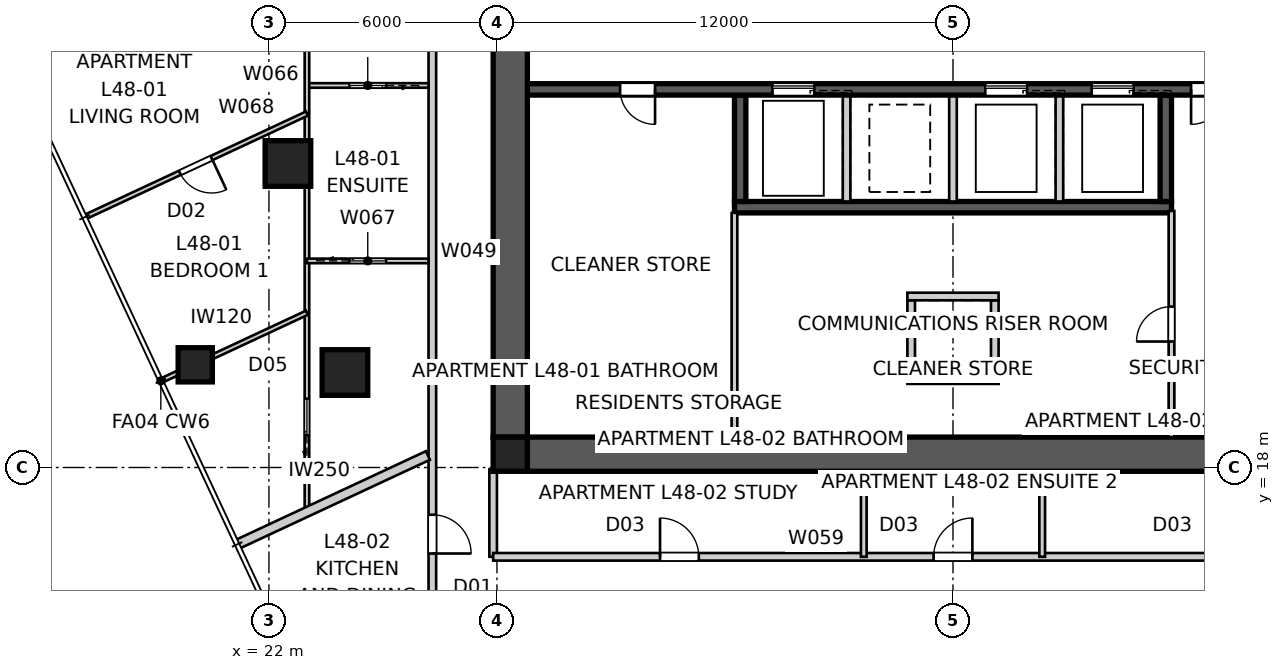
"""IFC4 building model, lengths in metres.
Left out: names, types, materials, properties, quantities, classifications, styles, units other than length and angle.
Written with IfcOpenShell. Run it as: python <this file> out.ifc"""

import sys

from ifc_helpers import new_model, si_unit, direction, frame, frame_2d, origin, origin_2d, place, context, subcontext, project, spatial, polyline, rectangle, outline, extrude, element, fill, save


model = new_model("IFC4")
c1 = context("Model", 3, precision=1e-05, world=origin(), true_north=direction((0.0, 1.0)))
c2 = subcontext(c1, "Body", "Model", "MODEL_VIEW")
j1 = project(units=[si_unit("LENGTHUNIT", "METRE"), si_unit("PLANEANGLEUNIT", "RADIAN")], contexts=[c1])
p1 = place(None, origin())
s1 = spatial("IfcSite", under=j1, at=p1, CompositionType="ELEMENT")
p2 = place(p1, origin())
s2 = spatial("IfcBuilding", under=s1, at=p2, CompositionType="ELEMENT")
p3 = place(p2, frame((0.0, 0.0, 176.0)))
s3 = spatial("IfcBuildingStorey", under=s2, at=p3, CompositionType="ELEMENT", Elevation=176.0)
p4 = place(p3, frame((51.2, 18.35, 0.0), z_axis=(0.0, 0.0, 1.0), x_axis=(-1.0, 0.0, 0.0)))
e1 = element("IfcWall", 1, at=p4, inside=s3, PredefinedType="SHEAR", context=c2, shape_type="SweptSolid", body=[
    extrude(outline(polyline([(0.0, -0.45), (22.4, -0.45), (22.4, -0.025), (22.85, -0.025), (22.85, 0.025), (22.4, 0.025), (22.4, 0.45), (0.0, 0.45), (0.0, 0.025), (-0.45, 0.025), (-0.45, -0.025), (0.0, -0.025), (0.0, -0.45)])), origin(), (0.0, 0.0, 1.0), 3.4),
])
p5 = place(p3, frame((28.35, 41.2, 0.0), z_axis=(0.0, 0.0, 1.0), x_axis=(0.0, -1.0, 0.0)))
e2 = element("IfcWall", 2, at=p5, inside=s3, PredefinedType="SHEAR", context=c2, shape_type="SweptSolid", body=[
    extrude(outline(polyline([(0.0, -0.45), (22.4, -0.45), (22.4, -0.025), (22.85, -0.025), (22.85, 0.025), (22.4, 0.025), (22.4, 0.45), (0.0, 0.45), (0.0, 0.025), (-0.45, 0.025), (-0.45, -0.025), (0.0, -0.025), (0.0, -0.45)])), origin(), (0.0, 0.0, 1.0), 3.4),
])
p6 = place(p5, frame((11.14, 0.0, 0.0)))
e3 = element("IfcOpeningElement", 3, at=p6, cuts=e2, PredefinedType="OPENING", context=c2, shape_type="SweptSolid", body=[
    extrude(rectangle(XDim=1.02, YDim=2.4, at=frame_2d((0.51, 1.2))), frame((0.0, 0.46, 0.0), z_axis=(0.0, -1.0, 0.0), x_axis=(1.0, 0.0, 0.0)), (0.0, 0.0, 1.0), 0.92),
])
p7 = place(p3, frame((51.2, 27.95, 0.0), z_axis=(0.0, 0.0, 1.0), x_axis=(-1.0, 0.0, 0.0)))
e4 = element("IfcWall", 4, at=p7, inside=s3, PredefinedType="SHEAR", context=c2, shape_type="SweptSolid", body=[
    extrude(rectangle(XDim=22.4, YDim=0.3, at=frame_2d((11.2, 0.0))), origin(), (0.0, 0.0, 1.0), 3.4),
])
p8 = place(p7, frame((19.04, 0.0, 0.0)))
e5 = element("IfcOpeningElement", 5, at=p8, cuts=e4, PredefinedType="OPENING", context=c2, shape_type="SweptSolid", body=[
    extrude(rectangle(XDim=0.92, YDim=2.1, at=frame_2d((0.46, 1.05))), frame((0.0, 0.16, 0.0), z_axis=(0.0, -1.0, 0.0), x_axis=(1.0, 0.0, 0.0)), (0.0, 0.0, 1.0), 0.32),
])
p9 = place(p7, frame((1.265, 0.0, 0.0)))
e6 = element("IfcOpeningElement", 6, at=p9, cuts=e4, PredefinedType="OPENING", context=c2, shape_type="SweptSolid", body=[
    extrude(rectangle(XDim=1.02, YDim=2.1, at=frame_2d((0.51, 1.05))), frame((0.0, 0.16, 0.0), z_axis=(0.0, -1.0, 0.0), x_axis=(1.0, 0.0, 0.0)), (0.0, 0.0, 1.0), 0.32),
])
p10 = place(p7, frame((4.015, 0.0, 0.0)))
e7 = element("IfcOpeningElement", 7, at=p10, cuts=e4, PredefinedType="OPENING", context=c2, shape_type="SweptSolid", body=[
    extrude(rectangle(XDim=0.92, YDim=2.1, at=frame_2d((0.46, 1.05))), frame((0.0, 0.16, 0.0), z_axis=(0.0, -1.0, 0.0), x_axis=(1.0, 0.0, 0.0)), (0.0, 0.0, 1.0), 0.32),
])
p11 = place(p7, frame((6.45, 0.0, 0.0)))
e8 = element("IfcOpeningElement", 8, at=p11, cuts=e4, PredefinedType="OPENING", context=c2, shape_type="SweptSolid", body=[
    extrude(rectangle(XDim=1.1, YDim=2.1, at=frame_2d((0.55, 1.05))), frame((0.0, 0.16, 0.0), z_axis=(0.0, -1.0, 0.0), x_axis=(1.0, 0.0, 0.0)), (0.0, 0.0, 1.0), 0.32),
])
p12 = place(p7, frame((9.25, 0.0, 0.0)))
e9 = element("IfcOpeningElement", 9, at=p12, cuts=e4, PredefinedType="OPENING", context=c2, shape_type="SweptSolid", body=[
    extrude(rectangle(XDim=1.1, YDim=2.1, at=frame_2d((0.55, 1.05))), frame((0.0, 0.16, 0.0), z_axis=(0.0, -1.0, 0.0), x_axis=(1.0, 0.0, 0.0)), (0.0, 0.0, 1.0), 0.32),
])
p13 = place(p7, frame((14.85, 0.0, 0.0)))
e10 = element("IfcOpeningElement", 10, at=p13, cuts=e4, PredefinedType="OPENING", context=c2, shape_type="SweptSolid", body=[
    extrude(rectangle(XDim=1.1, YDim=2.1, at=frame_2d((0.55, 1.05))), frame((0.0, 0.16, 0.0), z_axis=(0.0, -1.0, 0.0), x_axis=(1.0, 0.0, 0.0)), (0.0, 0.0, 1.0), 0.32),
])
p14 = place(p3, frame((45.75, 24.85, 0.0), z_axis=(0.0, 0.0, 1.0), x_axis=(-1.0, 0.0, 0.0)))
e11 = element("IfcWall", 11, at=p14, inside=s3, PredefinedType="SHEAR", context=c2, shape_type="SweptSolid", body=[
    extrude(rectangle(XDim=11.5, YDim=0.3, at=frame_2d((5.75, 0.0))), origin(), (0.0, 0.0, 1.0), 3.4),
])
p15 = place(p3, frame((45.6, 27.8, 0.0), z_axis=(0.0, 0.0, 1.0), x_axis=(0.0, -1.0, 0.0)))
e12 = element("IfcWall", 12, at=p15, inside=s3, PredefinedType="SHEAR", context=c2, shape_type="SweptSolid", body=[
    extrude(rectangle(XDim=2.8, YDim=0.3, at=frame_2d((1.4, 0.0))), origin(), (0.0, 0.0, 1.0), 3.4),
])
for number, where, z_axis, x_axis in (
    (13, (42.8, 27.8, 0.0), (0.0, 0.0, 1.0), (0.0, -1.0, 0.0)),
    (14, (40.0, 27.8, 0.0), (0.0, 0.0, 1.0), (0.0, -1.0, 0.0)),
    (15, (37.2, 27.8, 0.0), (0.0, 0.0, 1.0), (0.0, -1.0, 0.0)),
):
    element("IfcWall", number, at=place(p3, frame(where, z_axis=z_axis, x_axis=x_axis)), inside=s3, PredefinedType="SOLIDWALL", context=c2, shape_type="SweptSolid", body=[
        extrude(rectangle(XDim=2.8, YDim=0.2, at=frame_2d((1.4, 0.0))), origin(), (0.0, 0.0, 1.0), 3.4),
    ])
p16 = place(p3, frame((34.4, 27.8, 0.0), z_axis=(0.0, 0.0, 1.0), x_axis=(0.0, -1.0, 0.0)))
e16 = element("IfcWall", 16, at=p16, inside=s3, PredefinedType="SHEAR", context=c2, shape_type="SweptSolid", body=[
    extrude(rectangle(XDim=2.8, YDim=0.3, at=frame_2d((1.4, 0.0))), origin(), (0.0, 0.0, 1.0), 3.4),
])
for number, where, z_axis, x_axis in (
    (17, (38.9, 22.4, 0.0), (0.0, 0.0, 1.0), (0.0, -1.0, 0.0)),
    (18, (41.1, 22.4, 0.0), (0.0, 0.0, 1.0), (0.0, -1.0, 0.0)),
):
    element("IfcWall", number, at=place(p3, frame(where, z_axis=z_axis, x_axis=x_axis)), inside=s3, PredefinedType="SOLIDWALL", context=c2, shape_type="SweptSolid", body=[
        extrude(rectangle(XDim=2.0, YDim=0.2, at=frame_2d((1.0, 0.0))), origin(), (0.0, 0.0, 1.0), 3.4),
    ])
for number, where, z_axis, x_axis in (
    (19, (38.8, 22.5, 0.0), (0.0, 0.0, 1.0), (1.0, 0.0, 0.0)),
    (20, (38.8, 20.3, 0.0), (0.0, 0.0, 1.0), (1.0, 0.0, 0.0)),
):
    element("IfcWall", number, at=place(p3, frame(where, z_axis=z_axis, x_axis=x_axis)), inside=s3, PredefinedType="SOLIDWALL", context=c2, shape_type="SweptSolid", body=[
        extrude(rectangle(XDim=2.4, YDim=0.2, at=frame_2d((1.2, 0.0))), origin(), (0.0, 0.0, 1.0), 3.4),
    ])
p17 = place(p3, frame((28.35, 18.35, 0.0), z_axis=(0.0, 0.0, 1.0), x_axis=(1.0, 0.0, 0.0)))
e21 = element("IfcColumn", 21, at=p17, inside=s3, PredefinedType="COLUMN", context=c2, shape_type="SweptSolid", body=[
    extrude(rectangle(XDim=0.9, YDim=0.9, at=origin_2d()), origin(), (0.0, 0.0, 1.0), 3.4),
])
p18 = place(p3, frame((20.061, 20.702, -0.15), z_axis=(0.0, 0.0, 1.0), x_axis=(1.0, 0.0, 0.0)))
e22 = element("IfcColumn", 22, at=p18, inside=s3, PredefinedType="COLUMN", context=c2, shape_type="SweptSolid", body=[
    extrude(rectangle(XDim=0.9, YDim=0.9, at=origin_2d()), origin(), (0.0, 0.0, 1.0), 3.55),
])
for number, where, z_axis, x_axis in (
    (23, (22.5, 26.0, 0.0), (0.0, 0.0, 1.0), (1.0, 0.0, 0.0)),
    (24, (24.0, 20.5, 0.0), (0.0, 0.0, 1.0), (1.0, 0.0, 0.0)),
):
    element("IfcColumn", number, at=place(p3, frame(where, z_axis=z_axis, x_axis=x_axis)), inside=s3, PredefinedType="COLUMN", context=c2, shape_type="SweptSolid", body=[
        extrude(rectangle(XDim=1.2, YDim=1.2, at=origin_2d()), origin(), (0.0, 0.0, 1.0), 3.4),
    ])
p19 = place(p3, frame((26.3, 46.3, 0.0), z_axis=(0.0, 0.0, 1.0), x_axis=(0.0, -1.0, 0.0)))
e25 = element("IfcWall", 25, at=p19, inside=s3, PredefinedType="PARTITIONING", context=c2, shape_type="SweptSolid", body=[
    extrude(rectangle(XDim=32.6, YDim=0.2, at=frame_2d((16.3, 0.0))), origin(), (0.0, 0.0, 1.0), 3.25),
])
p20 = place(p19, frame((3.156, 0.0, 0.0)))
e26 = element("IfcOpeningElement", 26, at=p20, cuts=e25, PredefinedType="OPENING", context=c2, shape_type="SweptSolid", body=[
    extrude(rectangle(XDim=1.02, YDim=2.1, at=frame_2d((0.51, 1.05))), frame((0.0, 0.11, 0.0), z_axis=(0.0, -1.0, 0.0), x_axis=(1.0, 0.0, 0.0)), (0.0, 0.0, 1.0), 0.22),
])
p21 = place(p19, frame((14.68, 0.0, 0.0)))
e27 = element("IfcOpeningElement", 27, at=p21, cuts=e25, PredefinedType="OPENING", context=c2, shape_type="SweptSolid", body=[
    extrude(rectangle(XDim=1.02, YDim=2.34, at=frame_2d((0.51, 1.17))), frame((0.0, 0.11, 0.0), z_axis=(0.0, -1.0, 0.0), x_axis=(1.0, 0.0, 0.0)), (0.0, 0.0, 1.0), 0.22),
])
p22 = place(p19, frame((29.543, 0.0, 0.0)))
e28 = element("IfcOpeningElement", 28, at=p22, cuts=e25, PredefinedType="OPENING", context=c2, shape_type="SweptSolid", body=[
    extrude(rectangle(XDim=1.02, YDim=2.34, at=frame_2d((0.51, 1.17))), frame((0.0, 0.11, 0.0), z_axis=(0.0, -1.0, 0.0), x_axis=(1.0, 0.0, 0.0)), (0.0, 0.0, 1.0), 0.22),
])
p23 = place(p3, frame((15.14, 28.89, 0.0), z_axis=(0.0, 0.0, 1.0), x_axis=(0.906303906082, 0.422626584374, 0.0)))
e29 = element("IfcWall", 29, at=p23, inside=s3, PredefinedType="PARTITIONING", context=c2, shape_type="SweptSolid", body=[
    extrude(rectangle(XDim=12.185, YDim=0.25, at=frame_2d((6.092, 0.0))), origin(), (0.0, 0.0, 1.0), 3.25),
])
p24 = place(p3, frame((21.162, 15.975, 0.0), z_axis=(0.0, 0.0, 1.0), x_axis=(0.906309193024, 0.422615246577, 0.0)))
e30 = element("IfcWall", 30, at=p24, inside=s3, PredefinedType="PARTITIONING", context=c2, shape_type="SweptSolid", body=[
    extrude(rectangle(XDim=5.54, YDim=0.25, at=frame_2d((2.77, 0.0))), origin(), (0.0, 0.0, 1.0), 3.25),
])
p25 = place(p3, frame((45.75, 18.8, 0.0), z_axis=(0.0, 0.0, 1.0), x_axis=(0.0, 1.0, 0.0)))
e31 = element("IfcWall", 31, at=p25, inside=s3, PredefinedType="SOLIDWALL", context=c2, shape_type="SweptSolid", body=[
    extrude(rectangle(XDim=5.95, YDim=0.15, at=frame_2d((2.975, 0.0))), origin(), (0.0, 0.0, 1.0), 3.25),
])
p26 = place(p25, frame((2.515, 0.0, 0.0)))
e32 = element("IfcOpeningElement", 32, at=p26, cuts=e31, PredefinedType="OPENING", context=c2, shape_type="SweptSolid", body=[
    extrude(rectangle(XDim=0.92, YDim=2.1, at=frame_2d((0.46, 1.05))), frame((0.0, 0.085, 0.0), z_axis=(0.0, -1.0, 0.0), x_axis=(1.0, 0.0, 0.0)), (0.0, 0.0, 1.0), 0.17),
])
p27 = place(p3, frame((34.25, 18.8, 0.0), z_axis=(0.0, 0.0, 1.0), x_axis=(0.0, 1.0, 0.0)))
e33 = element("IfcWall", 33, at=p27, inside=s3, PredefinedType="SOLIDWALL", context=c2, shape_type="SweptSolid", body=[
    extrude(rectangle(XDim=5.9, YDim=0.15, at=frame_2d((2.95, 0.0))), origin(), (0.0, 0.0, 1.0), 3.25),
])
p28 = place(p3, frame((27.9, 17.95, 0.0), z_axis=(0.0, 0.0, 1.0), x_axis=(0.0, -1.0, 0.0)))
e34 = element("IfcWall", 34, at=p28, inside=s3, PredefinedType="PARTITIONING", context=c2, shape_type="SweptSolid", body=[
    extrude(rectangle(XDim=2.3, YDim=0.2, at=frame_2d((1.15, 0.0))), origin(), (0.0, 0.0, 1.0), 3.25),
])
p29 = place(p3, frame((27.9, 15.65, 0.0), z_axis=(0.0, 0.0, 1.0), x_axis=(1.0, 0.0, 0.0)))
e35 = element("IfcWall", 35, at=p29, inside=s3, PredefinedType="PARTITIONING", context=c2, shape_type="SweptSolid", body=[
    extrude(rectangle(XDim=24.2, YDim=0.2, at=frame_2d((12.1, 0.0))), origin(), (0.0, 0.0, 1.0), 3.25),
])
p30 = place(p29, frame((4.391, 0.0, 0.0)))
e36 = element("IfcOpeningElement", 36, at=p30, cuts=e35, PredefinedType="OPENING", context=c2, shape_type="SweptSolid", body=[
    extrude(rectangle(XDim=1.02, YDim=2.1, at=frame_2d((0.51, 1.05))), frame((0.0, 0.11, 0.0), z_axis=(0.0, -1.0, 0.0), x_axis=(1.0, 0.0, 0.0)), (0.0, 0.0, 1.0), 0.22),
])
p31 = place(p29, frame((18.789, 0.0, 0.0)))
e37 = element("IfcOpeningElement", 37, at=p31, cuts=e35, PredefinedType="OPENING", context=c2, shape_type="SweptSolid", body=[
    extrude(rectangle(XDim=1.02, YDim=2.1, at=frame_2d((0.51, 1.05))), frame((0.0, 0.11, 0.0), z_axis=(0.0, -1.0, 0.0), x_axis=(1.0, 0.0, 0.0)), (0.0, 0.0, 1.0), 0.22),
])
p32 = place(p29, frame((11.59, 0.0, 0.0)))
e38 = element("IfcOpeningElement", 38, at=p32, cuts=e35, PredefinedType="OPENING", context=c2, shape_type="SweptSolid", body=[
    extrude(rectangle(XDim=1.02, YDim=2.1, at=frame_2d((0.51, 1.05))), frame((0.0, 0.11, 0.0), z_axis=(0.0, -1.0, 0.0), x_axis=(1.0, 0.0, 0.0)), (0.0, 0.0, 1.0), 0.22),
])
for number, where, z_axis, x_axis in (
    (39, (37.653, 15.65, 0.0), (0.0, 0.0, 1.0), (0.0, 1.0, 0.0)),
    (40, (42.347, 15.65, 0.0), (0.0, 0.0, 1.0), (0.0, 1.0, 0.0)),
):
    element("IfcWall", number, at=place(p3, frame(where, z_axis=z_axis, x_axis=x_axis)), inside=s3, PredefinedType="SOLIDWALL", context=c2, shape_type="SweptSolid", body=[
        extrude(rectangle(XDim=2.25, YDim=0.15, at=frame_2d((1.125, 0.0))), origin(), (0.0, 0.0, 1.0), 3.25),
    ])
p33 = place(p3, frame((26.2, 28.054, 0.0), z_axis=(0.0, 0.0, 1.0), x_axis=(-1.0, 0.0, 0.0)))
e41 = element("IfcWall", 41, at=p33, inside=s3, PredefinedType="PARTITIONING", context=c2, shape_type="SweptSolid", body=[
    extrude(rectangle(XDim=3.2, YDim=0.12, at=frame_2d((1.6, 0.0))), origin(), (0.0, 0.0, 1.0), 3.25),
])
p34 = place(p33, frame((1.12, 0.0, 0.0)))
e42 = element("IfcOpeningElement", 42, at=p34, cuts=e41, PredefinedType="OPENING", context=c2, shape_type="SweptSolid", body=[
    extrude(rectangle(XDim=0.96, YDim=2.1, at=frame_2d((0.48, 1.05))), frame((0.0, 0.07, 0.0), z_axis=(0.0, -1.0, 0.0), x_axis=(1.0, 0.0, 0.0)), (0.0, 0.0, 1.0), 0.14),
])
p35 = place(p3, frame((23.0, 16.832, 0.0), z_axis=(0.0, 0.0, 1.0), x_axis=(0.0, 1.0, 0.0)))
e43 = element("IfcWall", 43, at=p35, inside=s3, PredefinedType="PARTITIONING", context=c2, shape_type="SweptSolid", body=[
    extrude(rectangle(XDim=30.574, YDim=0.12, at=frame_2d((15.287, 0.0))), origin(), (0.0, 0.0, 1.0), 2.55),
])
p36 = place(p35, frame((26.093, 0.0, 0.0)))
e44 = element("IfcOpeningElement", 44, at=p36, cuts=e43, PredefinedType="OPENING", context=c2, shape_type="SweptSolid", body=[
    extrude(rectangle(XDim=0.92, YDim=2.34, at=frame_2d((0.46, 1.17))), frame((0.0, 0.07, 0.0), z_axis=(0.0, -1.0, 0.0), x_axis=(1.0, 0.0, 0.0)), (0.0, 0.0, 1.0), 0.14),
])
p37 = place(p35, frame((13.012, 0.0, 0.0)))
e45 = element("IfcOpeningElement", 45, at=p37, cuts=e43, PredefinedType="OPENING", context=c2, shape_type="SweptSolid", body=[
    extrude(rectangle(XDim=0.92, YDim=2.34, at=frame_2d((0.46, 1.17))), frame((0.0, 0.07, 0.0), z_axis=(0.0, -1.0, 0.0), x_axis=(1.0, 0.0, 0.0)), (0.0, 0.0, 1.0), 0.14),
])
p38 = place(p35, frame((19.16, 0.0, 0.0)))
e46 = element("IfcOpeningElement", 46, at=p38, cuts=e43, PredefinedType="OPENING", context=c2, shape_type="SweptSolid", body=[
    extrude(rectangle(XDim=0.96, YDim=2.1, at=frame_2d((0.48, 1.05))), frame((0.0, 0.07, 0.0), z_axis=(0.0, -1.0, 0.0), x_axis=(1.0, 0.0, 0.0)), (0.0, 0.0, 1.0), 0.14),
])
p39 = place(p35, frame((2.018, 0.0, 0.0)))
e47 = element("IfcOpeningElement", 47, at=p39, cuts=e43, PredefinedType="OPENING", context=c2, shape_type="SweptSolid", body=[
    extrude(rectangle(XDim=0.96, YDim=2.1, at=frame_2d((0.48, 1.05))), frame((0.0, 0.07, 0.0), z_axis=(0.0, -1.0, 0.0), x_axis=(1.0, 0.0, 0.0)), (0.0, 0.0, 1.0), 0.14),
])
p40 = place(p3, frame((23.0, 23.436, 0.0), z_axis=(0.0, 0.0, 1.0), x_axis=(1.0, 0.0, 0.0)))
e48 = element("IfcWall", 48, at=p40, inside=s3, PredefinedType="PARTITIONING", context=c2, shape_type="SweptSolid", body=[
    extrude(rectangle(XDim=3.2, YDim=0.12, at=frame_2d((1.6, 0.0))), origin(), (0.0, 0.0, 1.0), 3.25),
])
p41 = place(p40, frame((1.12, 0.0, 0.0)))
e49 = element("IfcOpeningElement", 49, at=p41, cuts=e48, PredefinedType="OPENING", context=c2, shape_type="SweptSolid", body=[
    extrude(rectangle(XDim=0.96, YDim=2.1, at=frame_2d((0.48, 1.05))), frame((0.0, 0.07, 0.0), z_axis=(0.0, -1.0, 0.0), x_axis=(1.0, 0.0, 0.0)), (0.0, 0.0, 1.0), 0.14),
])
p42 = place(p3, frame((23.0, 27.314, 0.0), z_axis=(0.0, 0.0, 1.0), x_axis=(-0.906305562553, -0.422623032129, 0.0)))
e50 = element("IfcWall", 50, at=p42, inside=s3, PredefinedType="PARTITIONING", context=c2, shape_type="SweptSolid", body=[
    extrude(rectangle(XDim=6.417, YDim=0.12, at=frame_2d((3.209, 0.0))), origin(), (0.0, 0.0, 1.0), 3.25),
])
p43 = place(p42, frame((2.769, 0.0, 0.0)))
e51 = element("IfcOpeningElement", 51, at=p43, cuts=e50, PredefinedType="OPENING", context=c2, shape_type="SweptSolid", body=[
    extrude(rectangle(XDim=0.92, YDim=2.34, at=frame_2d((0.46, 1.17))), frame((0.0, 0.07, 0.0), z_axis=(0.0, -1.0, 0.0), x_axis=(1.0, 0.0, 0.0)), (0.0, 0.0, 1.0), 0.14),
])
p44 = place(p3, frame((23.0, 22.073, 0.0), z_axis=(0.0, 0.0, 1.0), x_axis=(-0.906304800396, -0.422624666552, 0.0)))
e52 = element("IfcWall", 52, at=p44, inside=s3, PredefinedType="PARTITIONING", context=c2, shape_type="SweptSolid", body=[
    extrude(rectangle(XDim=4.203, YDim=0.12, at=frame_2d((2.101, 0.0))), origin(), (0.0, 0.0, 1.0), 3.25),
])
p45 = place(p8, origin())
e53 = element("IfcDoor", 53, at=p45, inside=s3, OperationType="SINGLE_SWING_LEFT", PredefinedType="DOOR", context=c2, shape_type="SweptSolid", body=[
    extrude(rectangle(XDim=0.92, YDim=2.1, at=frame_2d((0.46, 1.05))), frame((0.0, 0.025, 0.0), z_axis=(0.0, -1.0, 0.0), x_axis=(1.0, 0.0, 0.0)), (0.0, 0.0, 1.0), 0.05),
])
fill(e5, e53)
p46 = place(p10, origin())
e54 = element("IfcDoor", 54, at=p46, inside=s3, OperationType="SINGLE_SWING_RIGHT", PredefinedType="DOOR", context=c2, shape_type="SweptSolid", body=[
    extrude(rectangle(XDim=0.92, YDim=2.1, at=frame_2d((0.46, 1.05))), frame((0.0, 0.025, 0.0), z_axis=(0.0, -1.0, 0.0), x_axis=(1.0, 0.0, 0.0)), (0.0, 0.0, 1.0), 0.05),
])
fill(e7, e54)
p47 = place(p30, origin())
e55 = element("IfcDoor", 55, at=p47, inside=s3, OperationType="SINGLE_SWING_LEFT", PredefinedType="DOOR", context=c2, shape_type="SweptSolid", body=[
    extrude(rectangle(XDim=1.02, YDim=2.1, at=frame_2d((0.51, 1.05))), frame((0.0, 0.025, 0.0), z_axis=(0.0, -1.0, 0.0), x_axis=(1.0, 0.0, 0.0)), (0.0, 0.0, 1.0), 0.05),
])
fill(e36, e55)
p48 = place(p22, origin())
e56 = element("IfcDoor", 56, at=p48, inside=s3, OperationType="SINGLE_SWING_RIGHT", PredefinedType="DOOR", context=c2, shape_type="SweptSolid", body=[
    extrude(rectangle(XDim=1.02, YDim=2.34, at=frame_2d((0.51, 1.17))), frame((0.0, 0.025, 0.0), z_axis=(0.0, -1.0, 0.0), x_axis=(1.0, 0.0, 0.0)), (0.0, 0.0, 1.0), 0.05),
])
fill(e28, e56)
p49 = place(p32, origin())
e57 = element("IfcDoor", 57, at=p49, inside=s3, OperationType="SINGLE_SWING_RIGHT", PredefinedType="DOOR", context=c2, shape_type="SweptSolid", body=[
    extrude(rectangle(XDim=1.02, YDim=2.1, at=frame_2d((0.51, 1.05))), frame((0.0, 0.025, 0.0), z_axis=(0.0, -1.0, 0.0), x_axis=(1.0, 0.0, 0.0)), (0.0, 0.0, 1.0), 0.05),
])
fill(e38, e57)
p50 = place(p26, origin())
e58 = element("IfcDoor", 58, at=p50, inside=s3, OperationType="SINGLE_SWING_LEFT", PredefinedType="DOOR", context=c2, shape_type="SweptSolid", body=[
    extrude(rectangle(XDim=0.92, YDim=2.1, at=frame_2d((0.46, 1.05))), frame((0.0, 0.025, 0.0), z_axis=(0.0, -1.0, 0.0), x_axis=(1.0, 0.0, 0.0)), (0.0, 0.0, 1.0), 0.05),
])
fill(e32, e58)
p51 = place(p34, origin())
e59 = element("IfcDoor", 59, at=p51, inside=s3, OperationType="SLIDING_TO_LEFT", PredefinedType="DOOR", context=c2, shape_type="SweptSolid", body=[
    extrude(rectangle(XDim=0.96, YDim=2.1, at=frame_2d((0.48, 1.05))), frame((0.0, 0.025, 0.0), z_axis=(0.0, -1.0, 0.0), x_axis=(1.0, 0.0, 0.0)), (0.0, 0.0, 1.0), 0.05),
])
fill(e42, e59)
p52 = place(p43, origin())
e60 = element("IfcDoor", 60, at=p52, inside=s3, OperationType="SINGLE_SWING_LEFT", PredefinedType="DOOR", context=c2, shape_type="SweptSolid", body=[
    extrude(rectangle(XDim=0.92, YDim=2.34, at=frame_2d((0.46, 1.17))), frame((0.0, 0.025, 0.0), z_axis=(0.0, -1.0, 0.0), x_axis=(1.0, 0.0, 0.0)), (0.0, 0.0, 1.0), 0.05),
])
fill(e51, e60)
p53 = place(p41, origin())
e61 = element("IfcDoor", 61, at=p53, inside=s3, OperationType="SLIDING_TO_LEFT", PredefinedType="DOOR", context=c2, shape_type="SweptSolid", body=[
    extrude(rectangle(XDim=0.96, YDim=2.1, at=frame_2d((0.48, 1.05))), frame((0.0, 0.025, 0.0), z_axis=(0.0, -1.0, 0.0), x_axis=(1.0, 0.0, 0.0)), (0.0, 0.0, 1.0), 0.05),
])
fill(e49, e61)
p54 = place(p39, origin())
e62 = element("IfcDoor", 62, at=p54, inside=s3, OperationType="SLIDING_TO_LEFT", PredefinedType="DOOR", context=c2, shape_type="SweptSolid", body=[
    extrude(rectangle(XDim=0.96, YDim=2.1, at=frame_2d((0.48, 1.05))), frame((0.0, 0.025, 0.0), z_axis=(0.0, -1.0, 0.0), x_axis=(1.0, 0.0, 0.0)), (0.0, 0.0, 1.0), 0.05),
])
fill(e47, e62)
p55 = place(p11, origin())
e63 = element("IfcDoor", 63, at=p55, inside=s3, OperationType="SLIDING_TO_LEFT", PredefinedType="DOOR", context=c2, shape_type="SweptSolid", body=[
    extrude(rectangle(XDim=1.1, YDim=2.1, at=frame_2d((0.55, 1.05))), frame((0.0, 0.025, 0.0), z_axis=(0.0, -1.0, 0.0), x_axis=(1.0, 0.0, 0.0)), (0.0, 0.0, 1.0), 0.05),
])
fill(e8, e63)
p56 = place(p12, origin())
e64 = element("IfcDoor", 64, at=p56, inside=s3, OperationType="SLIDING_TO_LEFT", PredefinedType="DOOR", context=c2, shape_type="SweptSolid", body=[
    extrude(rectangle(XDim=1.1, YDim=2.1, at=frame_2d((0.55, 1.05))), frame((0.0, 0.025, 0.0), z_axis=(0.0, -1.0, 0.0), x_axis=(1.0, 0.0, 0.0)), (0.0, 0.0, 1.0), 0.05),
])
fill(e9, e64)
p57 = place(p13, origin())
e65 = element("IfcDoor", 65, at=p57, inside=s3, OperationType="SLIDING_TO_LEFT", PredefinedType="DOOR", context=c2, shape_type="SweptSolid", body=[
    extrude(rectangle(XDim=1.1, YDim=2.1, at=frame_2d((0.55, 1.05))), frame((0.0, 0.025, 0.0), z_axis=(0.0, -1.0, 0.0), x_axis=(1.0, 0.0, 0.0)), (0.0, 0.0, 1.0), 0.05),
])
fill(e10, e65)
save(model, sys.argv[1])
